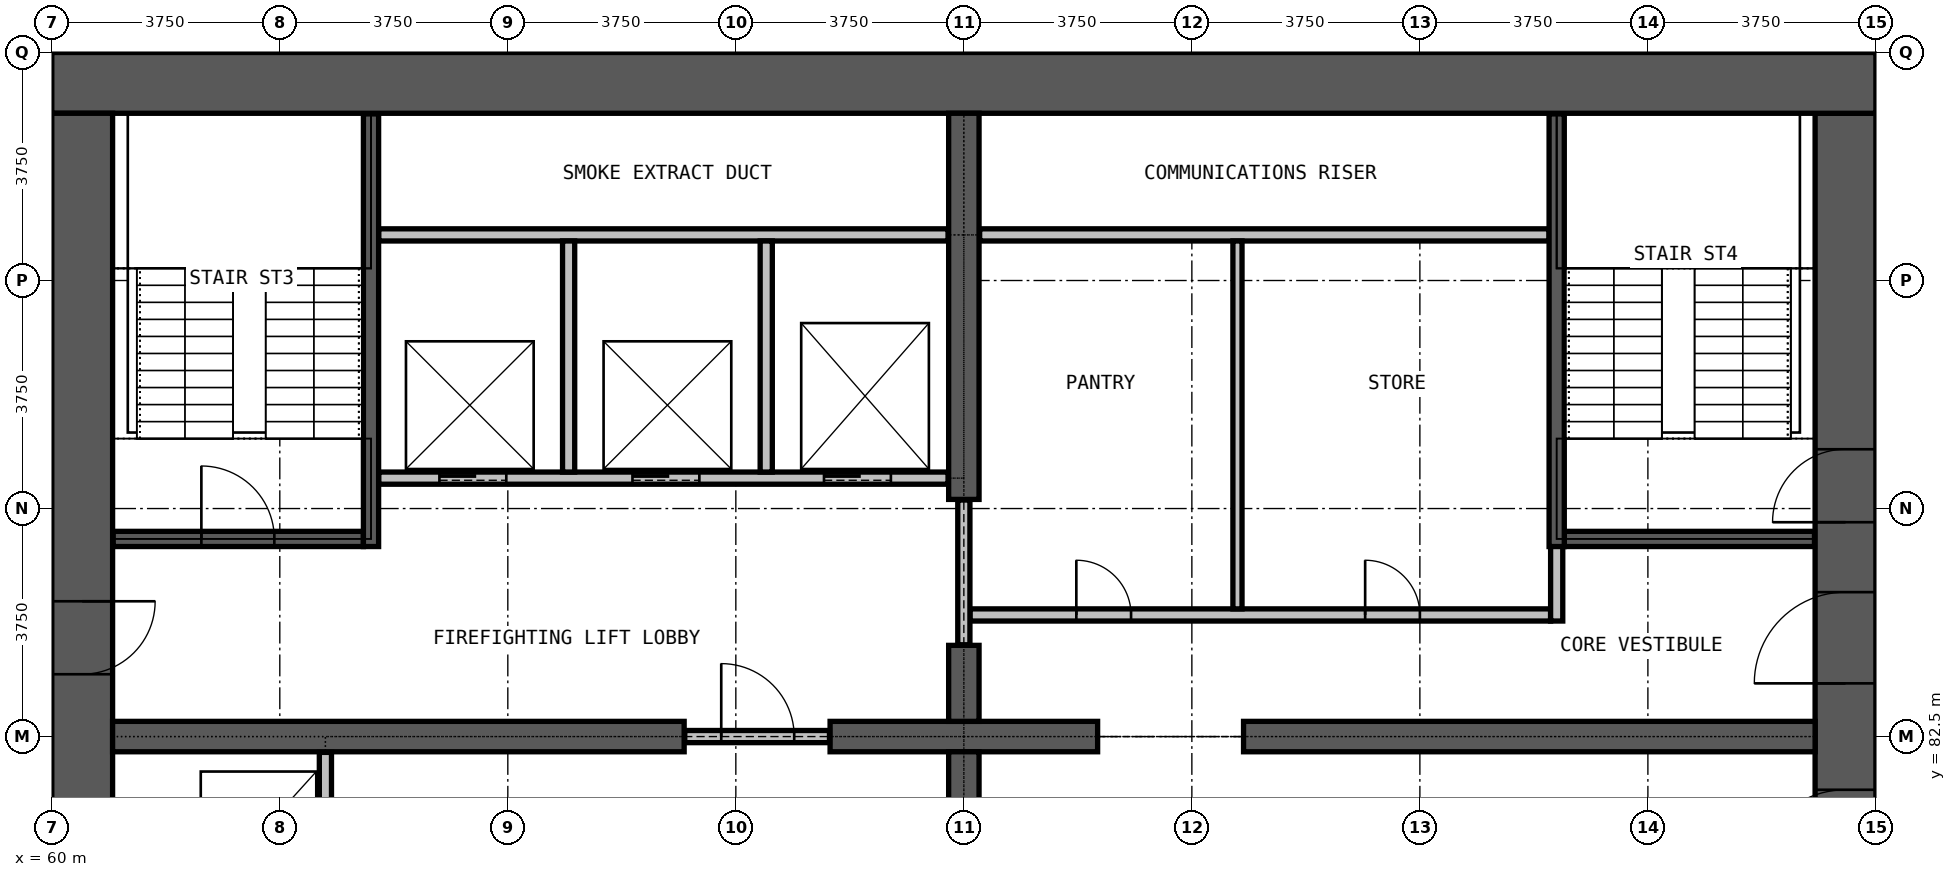
"""IFC4 building model, lengths in metres.
Left out: names, types, materials, properties, quantities, classifications, styles, units other than length and angle.
Written with IfcOpenShell. Run it as: python <this file> out.ifc"""

import sys

from ifc_helpers import new_model, si_unit, direction, frame, frame_2d, origin, place, context, subcontext, project, spatial, rectangle, extrude, element, fill, save


model = new_model("IFC4")
c1 = context("Model", 3, precision=1e-05, world=origin(), true_north=direction((0.0, 1.0)))
c2 = subcontext(c1, "Body", "Model", "MODEL_VIEW")
j1 = project(units=[si_unit("LENGTHUNIT", "METRE"), si_unit("PLANEANGLEUNIT", "RADIAN")], contexts=[c1])
p1 = place(None, origin())
s1 = spatial("IfcSite", under=j1, at=p1, CompositionType="ELEMENT")
p2 = place(p1, origin())
s2 = spatial("IfcBuilding", under=s1, at=p2, CompositionType="ELEMENT")
p3 = place(p2, origin())
s3 = spatial("IfcBuildingStorey", under=s2, at=p3, CompositionType="ELEMENT", Elevation=0.0)
p4 = place(p3, frame((89.5, 72.25, 0.0), z_axis=(0.0, 0.0, 1.0), x_axis=(0.0, 1.0, 0.0)))
e1 = element("IfcWall", 1, at=p4, inside=s3, PredefinedType="SHEAR", context=c2, shape_type="SweptSolid", body=[
    extrude(rectangle(XDim=20.5, YDim=1.0, at=frame_2d((10.25, 0.0))), origin(), (0.0, 0.0, 1.0), 7.5),
])
p5 = place(p4, frame((0.275, 0.0, 0.0)))
e2 = element("IfcOpeningElement", 2, at=p5, cuts=e1, PredefinedType="OPENING", context=c2, shape_type="SweptSolid", body=[
    extrude(rectangle(XDim=1.2, YDim=2.2, at=frame_2d((0.6, 1.1))), frame((0.0, 0.51, 0.0), z_axis=(0.0, -1.0, 0.0), x_axis=(1.0, 0.0, 0.0)), (0.0, 0.0, 1.0), 1.02),
])
p6 = place(p4, frame((13.775, 0.0, 0.0)))
e3 = element("IfcOpeningElement", 3, at=p6, cuts=e1, PredefinedType="OPENING", context=c2, shape_type="SweptSolid", body=[
    extrude(rectangle(XDim=1.2, YDim=2.2, at=frame_2d((0.6, 1.1))), frame((0.0, 0.51, 0.0), z_axis=(0.0, -1.0, 0.0), x_axis=(1.0, 0.0, 0.0)), (0.0, 0.0, 1.0), 1.02),
])
p7 = place(p4, frame((7.875, 0.0, 0.0)))
e4 = element("IfcOpeningElement", 4, at=p7, cuts=e1, PredefinedType="OPENING", context=c2, shape_type="SweptSolid", body=[
    extrude(rectangle(XDim=1.5, YDim=2.2, at=frame_2d((0.75, 1.1))), frame((0.0, 0.51, 0.0), z_axis=(0.0, -1.0, 0.0), x_axis=(1.0, 0.0, 0.0)), (0.0, 0.0, 1.0), 1.02),
])
p8 = place(p4, frame((11.125, 0.0, 0.0)))
e5 = element("IfcOpeningElement", 5, at=p8, cuts=e1, PredefinedType="OPENING", context=c2, shape_type="SweptSolid", body=[
    extrude(rectangle(XDim=1.5, YDim=2.2, at=frame_2d((0.75, 1.1))), frame((0.0, 0.51, 0.0), z_axis=(0.0, -1.0, 0.0), x_axis=(1.0, 0.0, 0.0)), (0.0, 0.0, 1.0), 1.02),
])
p9 = place(p3, frame((90.0, 93.25, 0.0), z_axis=(0.0, 0.0, 1.0), x_axis=(-1.0, 0.0, 0.0)))
e6 = element("IfcWall", 6, at=p9, inside=s3, PredefinedType="SHEAR", context=c2, shape_type="SweptSolid", body=[
    extrude(rectangle(XDim=30.0, YDim=1.0, at=frame_2d((15.0, 0.0))), origin(), (0.0, 0.0, 1.0), 7.5),
])
p10 = place(p3, frame((60.5, 92.75, 0.0), z_axis=(0.0, 0.0, 1.0), x_axis=(0.0, -1.0, 0.0)))
e7 = element("IfcWall", 7, at=p10, inside=s3, PredefinedType="SHEAR", context=c2, shape_type="SweptSolid", body=[
    extrude(rectangle(XDim=20.5, YDim=1.0, at=frame_2d((10.25, 0.0))), origin(), (0.0, 0.0, 1.0), 7.5),
])
p11 = place(p10, frame((19.025, 0.0, 0.0)))
e8 = element("IfcOpeningElement", 8, at=p11, cuts=e7, PredefinedType="OPENING", context=c2, shape_type="SweptSolid", body=[
    extrude(rectangle(XDim=1.2, YDim=2.2, at=frame_2d((0.6, 1.1))), frame((0.0, 0.51, 0.0), z_axis=(0.0, -1.0, 0.0), x_axis=(1.0, 0.0, 0.0)), (0.0, 0.0, 1.0), 1.02),
])
p12 = place(p10, frame((8.025, 0.0, 0.0)))
e9 = element("IfcOpeningElement", 9, at=p12, cuts=e7, PredefinedType="OPENING", context=c2, shape_type="SweptSolid", body=[
    extrude(rectangle(XDim=1.2, YDim=2.2, at=frame_2d((0.6, 1.1))), frame((0.0, 0.51, 0.0), z_axis=(0.0, -1.0, 0.0), x_axis=(1.0, 0.0, 0.0)), (0.0, 0.0, 1.0), 1.02),
])
p13 = place(p3, frame((61.0, 82.5, 0.0), z_axis=(0.0, 0.0, 1.0), x_axis=(1.0, 0.0, 0.0)))
e10 = element("IfcWall", 10, at=p13, inside=s3, PredefinedType="SHEAR", context=c2, shape_type="SweptSolid", body=[
    extrude(rectangle(XDim=9.4, YDim=0.5, at=frame_2d((4.7, 0.0))), origin(), (0.0, 0.0, 1.0), 7.5),
])
p14 = place(p3, frame((72.8, 82.5, 0.0), z_axis=(0.0, 0.0, 1.0), x_axis=(1.0, 0.0, 0.0)))
e11 = element("IfcWall", 11, at=p14, inside=s3, PredefinedType="SHEAR", context=c2, shape_type="SweptSolid", body=[
    extrude(rectangle(XDim=4.4, YDim=0.5, at=frame_2d((2.2, 0.0))), origin(), (0.0, 0.0, 1.0), 7.5),
])
p15 = place(p3, frame((79.6, 82.5, 0.0), z_axis=(0.0, 0.0, 1.0), x_axis=(1.0, 0.0, 0.0)))
e12 = element("IfcWall", 12, at=p15, inside=s3, PredefinedType="SHEAR", context=c2, shape_type="SweptSolid", body=[
    extrude(rectangle(XDim=9.4, YDim=0.5, at=frame_2d((4.7, 0.0))), origin(), (0.0, 0.0, 1.0), 7.5),
])
for number, where, z_axis, x_axis in (
    (13, (75.0, 81.0, 0.0), (0.0, 0.0, 1.0), (0.0, 1.0, 0.0)),
    (14, (75.0, 82.75, 0.0), (0.0, 0.0, 1.0), (0.0, 1.0, 0.0)),
):
    element("IfcWall", number, at=place(p3, frame(where, z_axis=z_axis, x_axis=x_axis)), inside=s3, PredefinedType="SHEAR", context=c2, shape_type="SweptSolid", body=[
        extrude(rectangle(XDim=1.25, YDim=0.5, at=frame_2d((0.625, 0.0))), origin(), (0.0, 0.0, 1.0), 7.5),
    ])
p16 = place(p3, frame((75.0, 86.4, 0.0), z_axis=(0.0, 0.0, 1.0), x_axis=(0.0, 1.0, 0.0)))
e15 = element("IfcWall", 15, at=p16, inside=s3, PredefinedType="SHEAR", context=c2, shape_type="SweptSolid", body=[
    extrude(rectangle(XDim=6.35, YDim=0.5, at=frame_2d((3.175, 0.0))), origin(), (0.0, 0.0, 1.0), 7.5),
])
p17 = place(p3, frame((70.41, 82.5, 0.0), z_axis=(0.0, 0.0, 1.0), x_axis=(1.0, 0.0, 0.0)))
e16 = element("IfcWall", 16, at=p17, inside=s3, PredefinedType="PARTITIONING", context=c2, shape_type="SweptSolid", body=[
    extrude(rectangle(XDim=2.38, YDim=0.2, at=frame_2d((1.19, 0.0))), origin(), (0.0, 0.0, 1.0), 2.4),
])
p18 = place(p17, frame((0.6, 0.0, 0.0)))
e17 = element("IfcOpeningElement", 17, at=p18, cuts=e16, PredefinedType="OPENING", context=c2, shape_type="SweptSolid", body=[
    extrude(rectangle(XDim=1.2, YDim=2.2, at=frame_2d((0.6, 1.1))), frame((0.0, 0.11, 0.0), z_axis=(0.0, -1.0, 0.0), x_axis=(1.0, 0.0, 0.0)), (0.0, 0.0, 1.0), 0.22),
])
p19 = place(p3, frame((75.1, 84.5, 0.0), z_axis=(0.0, 0.0, 1.0), x_axis=(1.0, 0.0, 0.0)))
e18 = element("IfcWall", 18, at=p19, inside=s3, PredefinedType="PARTITIONING", context=c2, shape_type="SweptSolid", body=[
    extrude(rectangle(XDim=9.55, YDim=0.2, at=frame_2d((4.775, 0.0))), origin(), (0.0, 0.0, 1.0), 7.15),
])
p20 = place(p19, frame((1.75, 0.0, 0.0)))
e19 = element("IfcOpeningElement", 19, at=p20, cuts=e18, PredefinedType="OPENING", context=c2, shape_type="SweptSolid", body=[
    extrude(rectangle(XDim=0.9, YDim=2.2, at=frame_2d((0.45, 1.1))), frame((0.0, 0.11, 0.0), z_axis=(0.0, -1.0, 0.0), x_axis=(1.0, 0.0, 0.0)), (0.0, 0.0, 1.0), 0.22),
])
p21 = place(p19, frame((6.5, 0.0, 0.0)))
e20 = element("IfcOpeningElement", 20, at=p21, cuts=e18, PredefinedType="OPENING", context=c2, shape_type="SweptSolid", body=[
    extrude(rectangle(XDim=0.9, YDim=2.2, at=frame_2d((0.45, 1.1))), frame((0.0, 0.11, 0.0), z_axis=(0.0, -1.0, 0.0), x_axis=(1.0, 0.0, 0.0)), (0.0, 0.0, 1.0), 0.22),
])
p22 = place(p3, frame((75.26, 90.75, 0.0), z_axis=(0.0, 0.0, 1.0), x_axis=(1.0, 0.0, 0.0)))
e21 = element("IfcWall", 21, at=p22, inside=s3, PredefinedType="PARTITIONING", context=c2, shape_type="SweptSolid", body=[
    extrude(rectangle(XDim=9.365, YDim=0.2, at=frame_2d((4.683, 0.0))), origin(), (0.0, 0.0, 1.0), 7.15),
])
p23 = place(p3, frame((75.0, 84.01, 0.0), z_axis=(0.0, 0.0, 1.0), x_axis=(0.0, 1.0, 0.0)))
e22 = element("IfcWall", 22, at=p23, inside=s3, PredefinedType="PARTITIONING", context=c2, shape_type="SweptSolid", body=[
    extrude(rectangle(XDim=2.38, YDim=0.2, at=frame_2d((1.19, 0.0))), origin(), (0.0, 0.0, 1.0), 2.4),
])
p24 = place(p3, frame((84.75, 84.4, 0.0), z_axis=(0.0, 0.0, 1.0), x_axis=(0.0, 1.0, 0.0)))
e23 = element("IfcWall", 23, at=p24, inside=s3, PredefinedType="PARTITIONING", context=c2, shape_type="SweptSolid", body=[
    extrude(rectangle(XDim=1.475, YDim=0.2, at=frame_2d((0.738, 0.0))), origin(), (0.0, 0.0, 1.0), 7.15),
])
p25 = place(p3, frame((79.5, 84.6, 0.0), z_axis=(0.0, 0.0, 1.0), x_axis=(0.0, 1.0, 0.0)))
e24 = element("IfcWall", 24, at=p25, inside=s3, PredefinedType="PARTITIONING", context=c2, shape_type="SweptSolid", body=[
    extrude(rectangle(XDim=6.05, YDim=0.15, at=frame_2d((3.025, 0.0))), origin(), (0.0, 0.0, 1.0), 7.15),
])
p26 = place(p3, frame((65.375, 86.75, 0.0), z_axis=(0.0, 0.0, 1.0), x_axis=(1.0, 0.0, 0.0)))
e25 = element("IfcWall", 25, at=p26, inside=s3, PredefinedType="PARTITIONING", context=c2, shape_type="SweptSolid", body=[
    extrude(rectangle(XDim=9.365, YDim=0.2, at=frame_2d((4.683, 0.0))), origin(), (0.0, 0.0, 1.0), 7.15),
])
p27 = place(p26, frame((1.0, 0.0, 0.0)))
e26 = element("IfcOpeningElement", 26, at=p27, cuts=e25, PredefinedType="OPENING", context=c2, shape_type="SweptSolid", body=[
    extrude(rectangle(XDim=1.1, YDim=2.2, at=frame_2d((0.55, 1.1))), frame((0.0, 0.11, 0.0), z_axis=(0.0, -1.0, 0.0), x_axis=(1.0, 0.0, 0.0)), (0.0, 0.0, 1.0), 0.22),
])
p28 = place(p26, frame((4.175, 0.0, 0.0)))
e27 = element("IfcOpeningElement", 27, at=p28, cuts=e25, PredefinedType="OPENING", context=c2, shape_type="SweptSolid", body=[
    extrude(rectangle(XDim=1.1, YDim=2.2, at=frame_2d((0.55, 1.1))), frame((0.0, 0.11, 0.0), z_axis=(0.0, -1.0, 0.0), x_axis=(1.0, 0.0, 0.0)), (0.0, 0.0, 1.0), 0.22),
])
p29 = place(p26, frame((7.325, 0.0, 0.0)))
e28 = element("IfcOpeningElement", 28, at=p29, cuts=e25, PredefinedType="OPENING", context=c2, shape_type="SweptSolid", body=[
    extrude(rectangle(XDim=1.1, YDim=2.2, at=frame_2d((0.55, 1.1))), frame((0.0, 0.11, 0.0), z_axis=(0.0, -1.0, 0.0), x_axis=(1.0, 0.0, 0.0)), (0.0, 0.0, 1.0), 0.22),
])
p30 = place(p3, frame((65.375, 90.75, 0.0), z_axis=(0.0, 0.0, 1.0), x_axis=(1.0, 0.0, 0.0)))
e29 = element("IfcWall", 29, at=p30, inside=s3, PredefinedType="PARTITIONING", context=c2, shape_type="SweptSolid", body=[
    extrude(rectangle(XDim=9.365, YDim=0.2, at=frame_2d((4.683, 0.0))), origin(), (0.0, 0.0, 1.0), 7.15),
])
p31 = place(p3, frame((64.5, 79.375, 0.0), z_axis=(0.0, 0.0, 1.0), x_axis=(0.0, 1.0, 0.0)))
e30 = element("IfcWall", 30, at=p31, inside=s3, PredefinedType="PARTITIONING", context=c2, shape_type="SweptSolid", body=[
    extrude(rectangle(XDim=2.865, YDim=0.2, at=frame_2d((1.433, 0.0))), origin(), (0.0, 0.0, 1.0), 7.15),
])
p32 = place(p31, frame((0.9, 0.0, 0.0)))
e31 = element("IfcOpeningElement", 31, at=p32, cuts=e30, PredefinedType="OPENING", context=c2, shape_type="SweptSolid", body=[
    extrude(rectangle(XDim=1.1, YDim=2.2, at=frame_2d((0.55, 1.1))), frame((0.0, 0.11, 0.0), z_axis=(0.0, -1.0, 0.0), x_axis=(1.0, 0.0, 0.0)), (0.0, 0.0, 1.0), 0.22),
])
for number, where, z_axis, x_axis in (
    (32, (68.5, 86.85, 0.0), (0.0, 0.0, 1.0), (0.0, 1.0, 0.0)),
    (33, (71.75, 86.85, 0.0), (0.0, 0.0, 1.0), (0.0, 1.0, 0.0)),
):
    element("IfcWall", number, at=place(p3, frame(where, z_axis=z_axis, x_axis=x_axis)), inside=s3, PredefinedType="PARTITIONING", context=c2, shape_type="SweptSolid", body=[
        extrude(rectangle(XDim=3.8, YDim=0.2, at=frame_2d((1.9, 0.0))), origin(), (0.0, 0.0, 1.0), 7.15),
    ])
p33 = place(p3, frame((61.01, 85.75, 0.0), z_axis=(0.0, 0.0, 1.0), x_axis=(1.0, 0.0, 0.0)))
e34 = element("IfcWall", 34, at=p33, inside=s3, PredefinedType="PARTITIONING", context=c2, shape_type="SweptSolid", body=[
    extrude(rectangle(XDim=4.115, YDim=0.25, at=frame_2d((2.058, 0.0))), origin(), (0.0, 0.0, 1.0), 7.15),
])
p34 = place(p33, frame((1.45, 0.0, 0.0)))
e35 = element("IfcOpeningElement", 35, at=p34, cuts=e34, PredefinedType="OPENING", context=c2, shape_type="SweptSolid", body=[
    extrude(rectangle(XDim=1.2, YDim=2.2, at=frame_2d((0.6, 1.1))), frame((0.0, 0.135, 0.0), z_axis=(0.0, -1.0, 0.0), x_axis=(1.0, 0.0, 0.0)), (0.0, 0.0, 1.0), 0.27),
])
p35 = place(p3, frame((84.875, 85.75, 0.0), z_axis=(0.0, 0.0, 1.0), x_axis=(1.0, 0.0, 0.0)))
e36 = element("IfcWall", 36, at=p35, inside=s3, PredefinedType="PARTITIONING", context=c2, shape_type="SweptSolid", body=[
    extrude(rectangle(XDim=4.115, YDim=0.25, at=frame_2d((2.058, 0.0))), origin(), (0.0, 0.0, 1.0), 7.15),
])
for number, where, z_axis, x_axis in (
    (37, (65.25, 85.625, 0.0), (0.0, 0.0, 1.0), (0.0, 1.0, 0.0)),
    (38, (84.75, 85.625, 0.0), (0.0, 0.0, 1.0), (0.0, 1.0, 0.0)),
):
    element("IfcWall", number, at=place(p3, frame(where, z_axis=z_axis, x_axis=x_axis)), inside=s3, PredefinedType="PARTITIONING", context=c2, shape_type="SweptSolid", body=[
        extrude(rectangle(XDim=7.115, YDim=0.25, at=frame_2d((3.558, 0.0))), origin(), (0.0, 0.0, 1.0), 7.15),
    ])
p36 = place(p27, origin())
e39 = element("IfcDoor", 39, at=p36, inside=s3, OperationType="DOUBLE_DOOR_SLIDING", PredefinedType="DOOR", context=c2, shape_type="SweptSolid", body=[
    extrude(rectangle(XDim=1.1, YDim=2.2, at=frame_2d((0.55, 1.1))), frame((0.0, 0.025, 0.0), z_axis=(0.0, -1.0, 0.0), x_axis=(1.0, 0.0, 0.0)), (0.0, 0.0, 1.0), 0.05),
])
fill(e26, e39)
p37 = place(p28, origin())
e40 = element("IfcDoor", 40, at=p37, inside=s3, OperationType="DOUBLE_DOOR_SLIDING", PredefinedType="DOOR", context=c2, shape_type="SweptSolid", body=[
    extrude(rectangle(XDim=1.1, YDim=2.2, at=frame_2d((0.55, 1.1))), frame((0.0, 0.025, 0.0), z_axis=(0.0, -1.0, 0.0), x_axis=(1.0, 0.0, 0.0)), (0.0, 0.0, 1.0), 0.05),
])
fill(e27, e40)
p38 = place(p29, origin())
e41 = element("IfcDoor", 41, at=p38, inside=s3, OperationType="DOUBLE_DOOR_SLIDING", PredefinedType="DOOR", context=c2, shape_type="SweptSolid", body=[
    extrude(rectangle(XDim=1.1, YDim=2.2, at=frame_2d((0.55, 1.1))), frame((0.0, 0.025, 0.0), z_axis=(0.0, -1.0, 0.0), x_axis=(1.0, 0.0, 0.0)), (0.0, 0.0, 1.0), 0.05),
])
fill(e28, e41)
p39 = place(p18, origin())
e42 = element("IfcDoor", 42, at=p39, inside=s3, OperationType="SINGLE_SWING_LEFT", PredefinedType="DOOR", context=c2, shape_type="SweptSolid", body=[
    extrude(rectangle(XDim=1.2, YDim=2.2, at=frame_2d((0.6, 1.1))), frame((0.0, 0.025, 0.0), z_axis=(0.0, -1.0, 0.0), x_axis=(1.0, 0.0, 0.0)), (0.0, 0.0, 1.0), 0.05),
])
fill(e17, e42)
p40 = place(p34, origin())
e43 = element("IfcDoor", 43, at=p40, inside=s3, OperationType="SINGLE_SWING_RIGHT", PredefinedType="DOOR", context=c2, shape_type="SweptSolid", body=[
    extrude(rectangle(XDim=1.2, YDim=2.2, at=frame_2d((0.6, 1.1))), frame((0.0, 0.025, 0.0), z_axis=(0.0, -1.0, 0.0), x_axis=(1.0, 0.0, 0.0)), (0.0, 0.0, 1.0), 0.05),
])
fill(e35, e43)
p41 = place(p6, origin())
e44 = element("IfcDoor", 44, at=p41, inside=s3, OperationType="SINGLE_SWING_RIGHT", PredefinedType="DOOR", context=c2, shape_type="SweptSolid", body=[
    extrude(rectangle(XDim=1.2, YDim=2.2, at=frame_2d((0.6, 1.1))), frame((0.0, 0.025, 0.0), z_axis=(0.0, -1.0, 0.0), x_axis=(1.0, 0.0, 0.0)), (0.0, 0.0, 1.0), 0.05),
])
fill(e3, e44)
p42 = place(p7, origin())
e45 = element("IfcDoor", 45, at=p42, inside=s3, OperationType="DOUBLE_DOOR_SINGLE_SWING", PredefinedType="DOOR", context=c2, shape_type="SweptSolid", body=[
    extrude(rectangle(XDim=1.5, YDim=2.2, at=frame_2d((0.75, 1.1))), frame((0.0, 0.025, 0.0), z_axis=(0.0, -1.0, 0.0), x_axis=(1.0, 0.0, 0.0)), (0.0, 0.0, 1.0), 0.05),
])
fill(e4, e45)
p43 = place(p12, origin())
e46 = element("IfcDoor", 46, at=p43, inside=s3, OperationType="SINGLE_SWING_LEFT", PredefinedType="DOOR", context=c2, shape_type="SweptSolid", body=[
    extrude(rectangle(XDim=1.2, YDim=2.2, at=frame_2d((0.6, 1.1))), frame((0.0, 0.025, 0.0), z_axis=(0.0, -1.0, 0.0), x_axis=(1.0, 0.0, 0.0)), (0.0, 0.0, 1.0), 0.05),
])
fill(e9, e46)
p44 = place(p8, origin())
e47 = element("IfcDoor", 47, at=p44, inside=s3, OperationType="DOUBLE_DOOR_SINGLE_SWING", PredefinedType="DOOR", context=c2, shape_type="SweptSolid", body=[
    extrude(rectangle(XDim=1.5, YDim=2.2, at=frame_2d((0.75, 1.1))), frame((0.0, 0.025, 0.0), z_axis=(0.0, -1.0, 0.0), x_axis=(1.0, 0.0, 0.0)), (0.0, 0.0, 1.0), 0.05),
])
fill(e5, e47)
p45 = place(p20, origin())
e48 = element("IfcDoor", 48, at=p45, inside=s3, OperationType="SINGLE_SWING_LEFT", PredefinedType="DOOR", context=c2, shape_type="SweptSolid", body=[
    extrude(rectangle(XDim=0.9, YDim=2.2, at=frame_2d((0.45, 1.1))), frame((0.0, 0.025, 0.0), z_axis=(0.0, -1.0, 0.0), x_axis=(1.0, 0.0, 0.0)), (0.0, 0.0, 1.0), 0.05),
])
fill(e19, e48)
p46 = place(p21, origin())
e49 = element("IfcDoor", 49, at=p46, inside=s3, OperationType="SINGLE_SWING_RIGHT", PredefinedType="DOOR", context=c2, shape_type="SweptSolid", body=[
    extrude(rectangle(XDim=0.9, YDim=2.2, at=frame_2d((0.45, 1.1))), frame((0.0, 0.025, 0.0), z_axis=(0.0, -1.0, 0.0), x_axis=(1.0, 0.0, 0.0)), (0.0, 0.0, 1.0), 0.05),
])
fill(e20, e49)
save(model, sys.argv[1])
